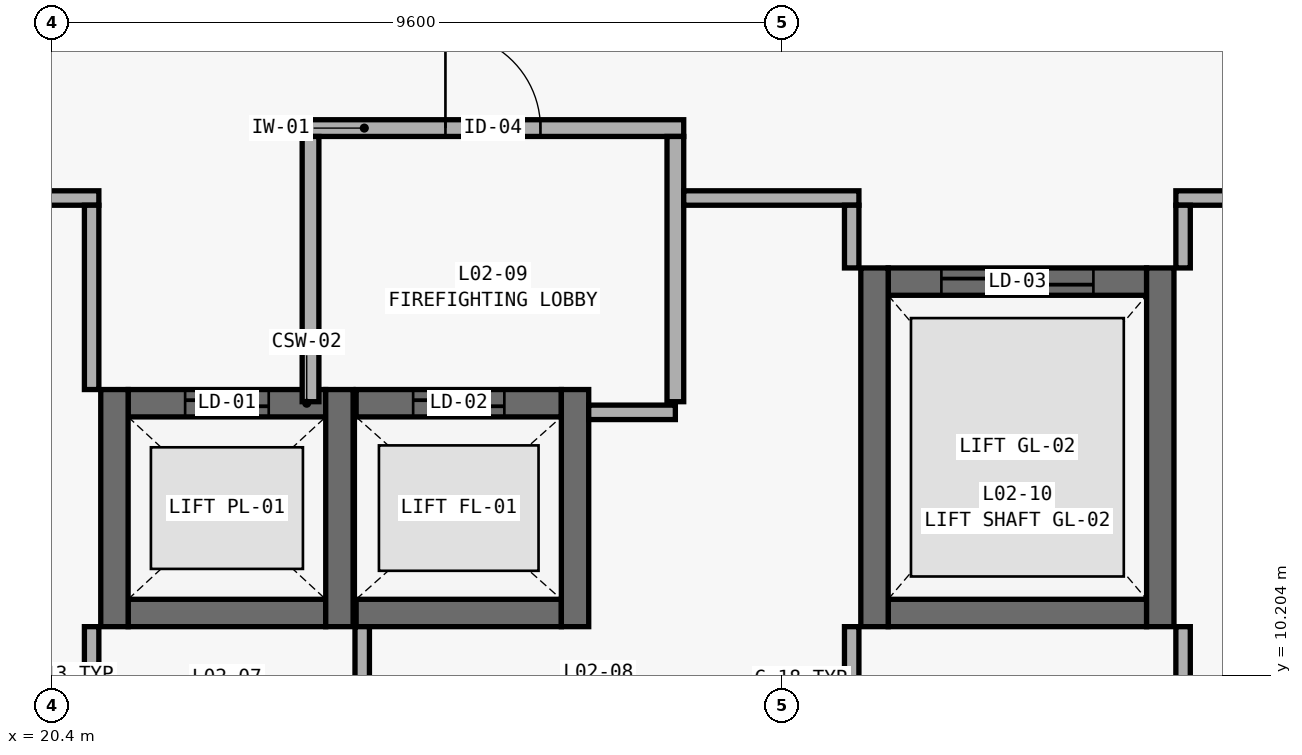
"""IFC4 building model, lengths in metres.
Left out: names, types, materials, properties, quantities, classifications, styles, units other than length and angle.
Written with IfcOpenShell. Run it as: python <this file> out.ifc"""

import sys

from ifc_helpers import new_model, si_unit, direction, frame, frame_2d, origin, place, context, subcontext, project, spatial, rectangle, extrude, element, fill, save


model = new_model("IFC4")
c1 = context("Model", 3, precision=1e-05, world=origin(), true_north=direction((0.0, 1.0)))
c2 = subcontext(c1, "Body", "Model", "MODEL_VIEW")
j1 = project(units=[si_unit("LENGTHUNIT", "METRE"), si_unit("PLANEANGLEUNIT", "RADIAN")], contexts=[c1])
p1 = place(None, origin())
s1 = spatial("IfcSite", under=j1, at=p1, CompositionType="ELEMENT")
p2 = place(p1, origin())
s2 = spatial("IfcBuilding", under=s1, at=p2, CompositionType="ELEMENT")
p3 = place(p2, frame((0.0, 0.0, 9.0)))
s3 = spatial("IfcBuildingStorey", under=s2, at=p3, CompositionType="ELEMENT", Elevation=9.0)
p4 = place(p3, frame((21.4, 13.78, 0.0), z_axis=(0.0, 0.0, 1.0), x_axis=(1.0, 0.0, 0.0)))
e1 = element("IfcWall", 1, at=p4, inside=s3, PredefinedType="SHEAR", context=c2, shape_type="SweptSolid", body=[
    extrude(rectangle(XDim=2.6, YDim=0.36, at=frame_2d((1.3, 0.0))), origin(), (0.0, 0.0, 1.0), 7.82),
])
p5 = place(p4, frame((0.75, 0.0, 0.0)))
e2 = element("IfcOpeningElement", 2, at=p5, cuts=e1, PredefinedType="OPENING", context=c2, shape_type="SweptSolid", body=[
    extrude(rectangle(XDim=1.1, YDim=2.15, at=frame_2d((0.55, 1.075))), frame((0.0, 0.195, 0.0), z_axis=(0.0, -1.0, 0.0), x_axis=(1.0, 0.0, 0.0)), (0.0, 0.0, 1.0), 0.39),
])
p6 = place(p3, frame((21.4, 11.02, 0.0), z_axis=(0.0, 0.0, 1.0), x_axis=(1.0, 0.0, 0.0)))
e3 = element("IfcWall", 3, at=p6, inside=s3, PredefinedType="SHEAR", context=c2, shape_type="SweptSolid", body=[
    extrude(rectangle(XDim=2.6, YDim=0.36, at=frame_2d((1.3, 0.0))), origin(), (0.0, 0.0, 1.0), 7.82),
])
for number, where, z_axis, x_axis in (
    (4, (21.22, 10.84, 0.0), (0.0, 0.0, 1.0), (0.0, 1.0, 0.0)),
    (5, (24.18, 10.84, 0.0), (0.0, 0.0, 1.0), (0.0, 1.0, 0.0)),
):
    element("IfcWall", number, at=place(p3, frame(where, z_axis=z_axis, x_axis=x_axis)), inside=s3, PredefinedType="SHEAR", context=c2, shape_type="SweptSolid", body=[
        extrude(rectangle(XDim=3.12, YDim=0.36, at=frame_2d((1.56, 0.0))), origin(), (0.0, 0.0, 1.0), 7.82),
    ])
p7 = place(p3, frame((24.4, 13.78, 0.0), z_axis=(0.0, 0.0, 1.0), x_axis=(1.0, 0.0, 0.0)))
e6 = element("IfcWall", 6, at=p7, inside=s3, PredefinedType="SHEAR", context=c2, shape_type="SweptSolid", body=[
    extrude(rectangle(XDim=2.7, YDim=0.36, at=frame_2d((1.35, 0.0))), origin(), (0.0, 0.0, 1.0), 7.82),
])
p8 = place(p7, frame((0.75, 0.0, 0.0)))
e7 = element("IfcOpeningElement", 7, at=p8, cuts=e6, PredefinedType="OPENING", context=c2, shape_type="SweptSolid", body=[
    extrude(rectangle(XDim=1.2, YDim=2.15, at=frame_2d((0.6, 1.075))), frame((0.0, 0.195, 0.0), z_axis=(0.0, -1.0, 0.0), x_axis=(1.0, 0.0, 0.0)), (0.0, 0.0, 1.0), 0.39),
])
p9 = place(p3, frame((24.4, 11.02, 0.0), z_axis=(0.0, 0.0, 1.0), x_axis=(1.0, 0.0, 0.0)))
e8 = element("IfcWall", 8, at=p9, inside=s3, PredefinedType="SHEAR", context=c2, shape_type="SweptSolid", body=[
    extrude(rectangle(XDim=2.7, YDim=0.36, at=frame_2d((1.35, 0.0))), origin(), (0.0, 0.0, 1.0), 7.82),
])
p10 = place(p3, frame((27.28, 10.84, 0.0), z_axis=(0.0, 0.0, 1.0), x_axis=(0.0, 1.0, 0.0)))
e9 = element("IfcWall", 9, at=p10, inside=s3, PredefinedType="SHEAR", context=c2, shape_type="SweptSolid", body=[
    extrude(rectangle(XDim=3.12, YDim=0.36, at=frame_2d((1.56, 0.0))), origin(), (0.0, 0.0, 1.0), 7.82),
])
p11 = place(p3, frame((23.69, 17.4, 0.0), z_axis=(0.0, 0.0, 1.0), x_axis=(1.0, 0.0, 0.0)))
e10 = element("IfcWall", 10, at=p11, inside=s3, PredefinedType="PARTITIONING", context=c2, shape_type="SweptSolid", body=[
    extrude(rectangle(XDim=5.02, YDim=0.22, at=frame_2d((2.51, 0.0))), origin(), (0.0, 0.0, 1.0), 6.7),
])
p12 = place(p11, frame((1.885, 0.0, 0.0)))
e11 = element("IfcOpeningElement", 11, at=p12, cuts=e10, PredefinedType="OPENING", context=c2, shape_type="SweptSolid", body=[
    extrude(rectangle(XDim=1.25, YDim=2.15, at=frame_2d((0.625, 1.075))), frame((0.0, 0.125, 0.0), z_axis=(0.0, -1.0, 0.0), x_axis=(1.0, 0.0, 0.0)), (0.0, 0.0, 1.0), 0.25),
])
for number, where, z_axis, x_axis in (
    (12, (23.8, 13.8, 0.0), (0.0, 0.0, 1.0), (0.0, 1.0, 0.0)),
    (13, (28.6, 13.8, 0.0), (0.0, 0.0, 1.0), (0.0, 1.0, 0.0)),
):
    element("IfcWall", number, at=place(p3, frame(where, z_axis=z_axis, x_axis=x_axis)), inside=s3, PredefinedType="PARTITIONING", context=c2, shape_type="SweptSolid", body=[
        extrude(rectangle(XDim=3.49, YDim=0.22, at=frame_2d((1.745, 0.0))), origin(), (0.0, 0.0, 1.0), 6.7),
    ])
p13 = place(p3, frame((31.4, 15.38, 0.0), z_axis=(0.0, 0.0, 1.0), x_axis=(1.0, 0.0, 0.0)))
e14 = element("IfcWall", 14, at=p13, inside=s3, PredefinedType="SHEAR", context=c2, shape_type="SweptSolid", body=[
    extrude(rectangle(XDim=3.4, YDim=0.36, at=frame_2d((1.7, 0.0))), origin(), (0.0, 0.0, 1.0), 7.82),
])
p14 = place(p13, frame((0.7, 0.0, 0.0)))
e15 = element("IfcOpeningElement", 15, at=p14, cuts=e14, PredefinedType="OPENING", context=c2, shape_type="SweptSolid", body=[
    extrude(rectangle(XDim=2.0, YDim=2.4, at=frame_2d((1.0, 1.2))), frame((0.0, 0.195, 0.0), z_axis=(0.0, -1.0, 0.0), x_axis=(1.0, 0.0, 0.0)), (0.0, 0.0, 1.0), 0.39),
])
p15 = place(p3, frame((31.4, 11.02, 0.0), z_axis=(0.0, 0.0, 1.0), x_axis=(1.0, 0.0, 0.0)))
e16 = element("IfcWall", 16, at=p15, inside=s3, PredefinedType="SHEAR", context=c2, shape_type="SweptSolid", body=[
    extrude(rectangle(XDim=3.4, YDim=0.36, at=frame_2d((1.7, 0.0))), origin(), (0.0, 0.0, 1.0), 7.82),
])
for number, where, z_axis, x_axis in (
    (17, (31.22, 10.84, 0.0), (0.0, 0.0, 1.0), (0.0, 1.0, 0.0)),
    (18, (34.98, 10.84, 0.0), (0.0, 0.0, 1.0), (0.0, 1.0, 0.0)),
):
    element("IfcWall", number, at=place(p3, frame(where, z_axis=z_axis, x_axis=x_axis)), inside=s3, PredefinedType="SHEAR", context=c2, shape_type="SweptSolid", body=[
        extrude(rectangle(XDim=4.72, YDim=0.36, at=frame_2d((2.36, 0.0))), origin(), (0.0, 0.0, 1.0), 7.82),
    ])
p16 = place(p3, frame((27.46, 13.66, 0.0), z_axis=(0.0, 0.0, 1.0), x_axis=(1.0, 0.0, 0.0)))
e19 = element("IfcWall", 19, at=p16, inside=s3, PredefinedType="PARTITIONING", context=c2, shape_type="SweptSolid", body=[
    extrude(rectangle(XDim=1.14, YDim=0.19, at=frame_2d((0.57, 0.0))), origin(), (0.0, 0.0, 1.0), 6.7),
])
p17 = place(p3, frame((19.685, 16.48, 0.0), z_axis=(0.0, 0.0, 1.0), x_axis=(1.0, 0.0, 0.0)))
e20 = element("IfcWall", 20, at=p17, inside=s3, PredefinedType="PARTITIONING", context=c2, shape_type="SweptSolid", body=[
    extrude(rectangle(XDim=1.33, YDim=0.19, at=frame_2d((0.665, 0.0))), origin(), (0.0, 0.0, 1.0), 6.7),
])
p18 = place(p3, frame((28.71, 16.48, 0.0), z_axis=(0.0, 0.0, 1.0), x_axis=(1.0, 0.0, 0.0)))
e21 = element("IfcWall", 21, at=p18, inside=s3, PredefinedType="PARTITIONING", context=c2, shape_type="SweptSolid", body=[
    extrude(rectangle(XDim=2.305, YDim=0.19, at=frame_2d((1.152, 0.0))), origin(), (0.0, 0.0, 1.0), 6.7),
])
p19 = place(p3, frame((35.185, 16.48, 0.0), z_axis=(0.0, 0.0, 1.0), x_axis=(1.0, 0.0, 0.0)))
e22 = element("IfcWall", 22, at=p19, inside=s3, PredefinedType="PARTITIONING", context=c2, shape_type="SweptSolid", body=[
    extrude(rectangle(XDim=9.03, YDim=0.19, at=frame_2d((4.515, 0.0))), origin(), (0.0, 0.0, 1.0), 6.7),
])
p20 = place(p3, frame((20.92, 9.015, 0.0), z_axis=(0.0, 0.0, 1.0), x_axis=(0.0, 1.0, 0.0)))
e23 = element("IfcWall", 23, at=p20, inside=s3, PredefinedType="PARTITIONING", context=c2, shape_type="SweptSolid", body=[
    extrude(rectangle(XDim=1.825, YDim=0.19, at=frame_2d((0.913, 0.0))), origin(), (0.0, 0.0, 1.0), 6.7),
])
p21 = place(p3, frame((20.92, 13.96, 0.0), z_axis=(0.0, 0.0, 1.0), x_axis=(0.0, 1.0, 0.0)))
e24 = element("IfcWall", 24, at=p21, inside=s3, PredefinedType="PARTITIONING", context=c2, shape_type="SweptSolid", body=[
    extrude(rectangle(XDim=2.425, YDim=0.19, at=frame_2d((1.212, 0.0))), origin(), (0.0, 0.0, 1.0), 6.7),
])
for number, where, z_axis, x_axis in (
    (25, (24.48, 9.015, 0.0), (0.0, 0.0, 1.0), (0.0, 1.0, 0.0)),
    (26, (30.92, 9.015, 0.0), (0.0, 0.0, 1.0), (0.0, 1.0, 0.0)),
):
    element("IfcWall", number, at=place(p3, frame(where, z_axis=z_axis, x_axis=x_axis)), inside=s3, PredefinedType="PARTITIONING", context=c2, shape_type="SweptSolid", body=[
        extrude(rectangle(XDim=1.825, YDim=0.19, at=frame_2d((0.913, 0.0))), origin(), (0.0, 0.0, 1.0), 6.7),
    ])
p22 = place(p3, frame((30.92, 15.56, 0.0), z_axis=(0.0, 0.0, 1.0), x_axis=(0.0, 1.0, 0.0)))
e27 = element("IfcWall", 27, at=p22, inside=s3, PredefinedType="PARTITIONING", context=c2, shape_type="SweptSolid", body=[
    extrude(rectangle(XDim=0.825, YDim=0.19, at=frame_2d((0.413, 0.0))), origin(), (0.0, 0.0, 1.0), 6.7),
])
p23 = place(p3, frame((35.28, 9.015, 0.0), z_axis=(0.0, 0.0, 1.0), x_axis=(0.0, 1.0, 0.0)))
e28 = element("IfcWall", 28, at=p23, inside=s3, PredefinedType="PARTITIONING", context=c2, shape_type="SweptSolid", body=[
    extrude(rectangle(XDim=1.825, YDim=0.19, at=frame_2d((0.913, 0.0))), origin(), (0.0, 0.0, 1.0), 6.7),
])
p24 = place(p3, frame((35.28, 15.56, 0.0), z_axis=(0.0, 0.0, 1.0), x_axis=(0.0, 1.0, 0.0)))
e29 = element("IfcWall", 29, at=p24, inside=s3, PredefinedType="PARTITIONING", context=c2, shape_type="SweptSolid", body=[
    extrude(rectangle(XDim=0.825, YDim=0.19, at=frame_2d((0.413, 0.0))), origin(), (0.0, 0.0, 1.0), 6.7),
])
p25 = place(p5, origin())
e30 = element("IfcDoor", 30, at=p25, inside=s3, OperationType="DOUBLE_DOOR_SLIDING", PredefinedType="DOOR", context=c2, shape_type="SweptSolid", body=[
    extrude(rectangle(XDim=1.1, YDim=2.15, at=frame_2d((0.55, 1.075))), frame((0.0, 0.025, 0.0), z_axis=(0.0, -1.0, 0.0), x_axis=(1.0, 0.0, 0.0)), (0.0, 0.0, 1.0), 0.05),
])
fill(e2, e30)
p26 = place(p8, origin())
e31 = element("IfcDoor", 31, at=p26, inside=s3, OperationType="DOUBLE_DOOR_SLIDING", PredefinedType="DOOR", context=c2, shape_type="SweptSolid", body=[
    extrude(rectangle(XDim=1.2, YDim=2.15, at=frame_2d((0.6, 1.075))), frame((0.0, 0.025, 0.0), z_axis=(0.0, -1.0, 0.0), x_axis=(1.0, 0.0, 0.0)), (0.0, 0.0, 1.0), 0.05),
])
fill(e7, e31)
p27 = place(p12, origin())
e32 = element("IfcDoor", 32, at=p27, inside=s3, OperationType="SINGLE_SWING_LEFT", PredefinedType="DOOR", context=c2, shape_type="SweptSolid", body=[
    extrude(rectangle(XDim=1.25, YDim=2.15, at=frame_2d((0.625, 1.075))), frame((0.0, 0.025, 0.0), z_axis=(0.0, -1.0, 0.0), x_axis=(1.0, 0.0, 0.0)), (0.0, 0.0, 1.0), 0.05),
])
fill(e11, e32)
p28 = place(p14, origin())
e33 = element("IfcDoor", 33, at=p28, inside=s3, OperationType="DOUBLE_DOOR_SLIDING", PredefinedType="DOOR", context=c2, shape_type="SweptSolid", body=[
    extrude(rectangle(XDim=2.0, YDim=2.4, at=frame_2d((1.0, 1.2))), frame((0.0, 0.025, 0.0), z_axis=(0.0, -1.0, 0.0), x_axis=(1.0, 0.0, 0.0)), (0.0, 0.0, 1.0), 0.05),
])
fill(e15, e33)
save(model, sys.argv[1])
